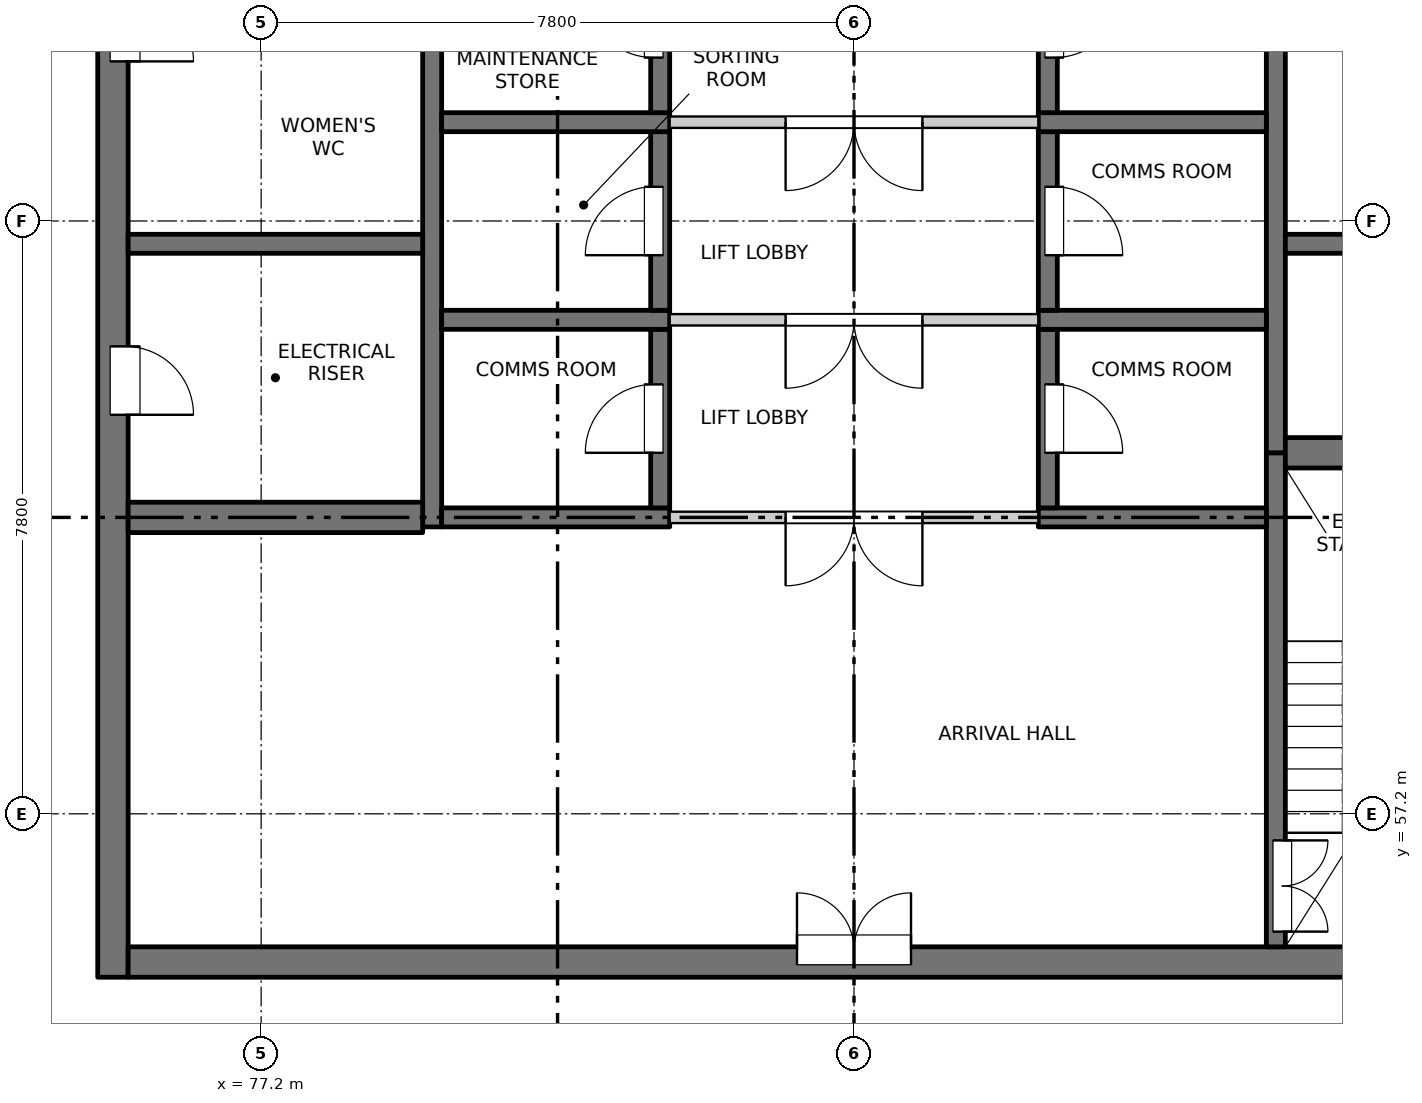
"""IFC4 building model, lengths in metres.
Left out: names, types, materials, properties, quantities, classifications, styles, units other than length and angle.
Written with IfcOpenShell. Run it as: python <this file> out.ifc"""

import sys

from ifc_helpers import new_model, si_unit, direction, frame, frame_2d, origin, place, context, subcontext, project, spatial, rectangle, extrude, element, fill, save


model = new_model("IFC4")
c1 = context("Model", 3, precision=1e-05, world=origin(), true_north=direction((0.0, 1.0)))
c2 = subcontext(c1, "Body", "Model", "MODEL_VIEW")
j1 = project(units=[si_unit("LENGTHUNIT", "METRE"), si_unit("PLANEANGLEUNIT", "RADIAN")], contexts=[c1])
p1 = place(None, origin())
s1 = spatial("IfcSite", under=j1, at=p1, CompositionType="ELEMENT")
p2 = place(p1, origin())
s2 = spatial("IfcBuilding", under=s1, at=p2, CompositionType="ELEMENT")
p3 = place(p2, frame((0.0, 0.0, 263.0)))
s3 = spatial("IfcBuildingStorey", under=s2, at=p3, CompositionType="ELEMENT", Elevation=263.0)
p4 = place(p3, frame((75.25, 55.05, -0.25), z_axis=(0.0, 0.0, 1.0), x_axis=(0.0, 1.0, 0.0)))
e1 = element("IfcWall", 1, at=p4, inside=s3, PredefinedType="SOLIDWALL", context=c2, shape_type="SweptSolid", body=[
    extrude(rectangle(XDim=22.25, YDim=0.4, at=frame_2d((11.125, 0.0))), origin(), (0.0, 0.0, 1.0), 3.35),
])
p5 = place(p4, frame((7.4, 0.0, 0.25)))
e2 = element("IfcOpeningElement", 2, at=p5, cuts=e1, PredefinedType="OPENING", context=c2, shape_type="SweptSolid", body=[
    extrude(rectangle(XDim=0.9, YDim=2.1, at=frame_2d((0.45, 1.05))), frame((0.0, 0.21, 0.0), z_axis=(0.0, -1.0, 0.0), x_axis=(1.0, 0.0, 0.0)), (0.0, 0.0, 1.0), 0.42),
])
p6 = place(p4, frame((12.05, 0.0, 0.25)))
e3 = element("IfcOpeningElement", 3, at=p6, cuts=e1, PredefinedType="OPENING", context=c2, shape_type="SweptSolid", body=[
    extrude(rectangle(XDim=0.9, YDim=2.1, at=frame_2d((0.45, 1.05))), frame((0.0, 0.21, 0.0), z_axis=(0.0, -1.0, 0.0), x_axis=(1.0, 0.0, 0.0)), (0.0, 0.0, 1.0), 0.42),
])
p7 = place(p4, frame((16.55, 0.0, 0.25)))
e4 = element("IfcOpeningElement", 4, at=p7, cuts=e1, PredefinedType="OPENING", context=c2, shape_type="SweptSolid", body=[
    extrude(rectangle(XDim=0.9, YDim=2.1, at=frame_2d((0.45, 1.05))), frame((0.0, 0.21, 0.0), z_axis=(0.0, -1.0, 0.0), x_axis=(1.0, 0.0, 0.0)), (0.0, 0.0, 1.0), 0.42),
])
p8 = place(p4, frame((20.0, 0.0, 0.25)))
e5 = element("IfcOpeningElement", 5, at=p8, cuts=e1, PredefinedType="OPENING", context=c2, shape_type="SweptSolid", body=[
    extrude(rectangle(XDim=0.9, YDim=2.1, at=frame_2d((0.45, 1.05))), frame((0.0, 0.21, 0.0), z_axis=(0.0, -1.0, 0.0), x_axis=(1.0, 0.0, 0.0)), (0.0, 0.0, 1.0), 0.42),
])
p9 = place(p3, frame((75.45, 55.25, -0.25), z_axis=(0.0, 0.0, 1.0), x_axis=(1.0, 0.0, 0.0)))
e6 = element("IfcWall", 6, at=p9, inside=s3, PredefinedType="SOLIDWALL", context=c2, shape_type="SweptSolid", body=[
    extrude(rectangle(XDim=19.1, YDim=0.4, at=frame_2d((9.55, 0.0))), origin(), (0.0, 0.0, 1.0), 3.35),
])
p10 = place(p9, frame((8.8, 0.0, 0.25)))
e7 = element("IfcOpeningElement", 7, at=p10, cuts=e6, PredefinedType="OPENING", context=c2, shape_type="SweptSolid", body=[
    extrude(rectangle(XDim=1.5, YDim=2.1, at=frame_2d((0.75, 1.05))), frame((0.0, 0.21, 0.0), z_axis=(0.0, -1.0, 0.0), x_axis=(1.0, 0.0, 0.0)), (0.0, 0.0, 1.0), 0.42),
])
p11 = place(p3, frame((79.45, 60.975, -0.25), z_axis=(0.0, 0.0, 1.0), x_axis=(0.0, 1.0, 0.0)))
e8 = element("IfcWall", 8, at=p11, inside=s3, PredefinedType="SOLIDWALL", context=c2, shape_type="SweptSolid", body=[
    extrude(rectangle(XDim=16.325, YDim=0.25, at=frame_2d((8.163, 0.0))), origin(), (0.0, 0.0, 1.0), 3.35),
])
p12 = place(p3, frame((90.55, 55.45, -0.25), z_axis=(0.0, 0.0, 1.0), x_axis=(0.0, 1.0, 0.0)))
e9 = element("IfcWall", 9, at=p12, inside=s3, PredefinedType="SOLIDWALL", context=c2, shape_type="SweptSolid", body=[
    extrude(rectangle(XDim=6.5, YDim=0.25, at=frame_2d((3.25, 0.0))), origin(), (0.0, 0.0, 1.0), 3.35),
])
p13 = place(p12, frame((0.2, 0.0, 0.25)))
e10 = element("IfcOpeningElement", 10, at=p13, cuts=e9, PredefinedType="OPENING", context=c2, shape_type="SweptSolid", body=[
    extrude(rectangle(XDim=1.2, YDim=2.1, at=frame_2d((0.6, 1.05))), frame((0.0, 0.135, 0.0), z_axis=(0.0, -1.0, 0.0), x_axis=(1.0, 0.0, 0.0)), (0.0, 0.0, 1.0), 0.27),
])
p14 = place(p3, frame((90.55, 61.95, -0.25), z_axis=(0.0, 0.0, 1.0), x_axis=(0.0, 1.0, 0.0)))
e11 = element("IfcWall", 11, at=p14, inside=s3, PredefinedType="SOLIDWALL", context=c2, shape_type="SweptSolid", body=[
    extrude(rectangle(XDim=15.35, YDim=0.25, at=frame_2d((7.675, 0.0))), origin(), (0.0, 0.0, 1.0), 3.35),
])
p15 = place(p3, frame((79.575, 61.1, -0.25), z_axis=(0.0, 0.0, 1.0), x_axis=(1.0, 0.0, 0.0)))
e12 = element("IfcWall", 12, at=p15, inside=s3, PredefinedType="SOLIDWALL", context=c2, shape_type="SweptSolid", body=[
    extrude(rectangle(XDim=3.0, YDim=0.25, at=frame_2d((1.5, 0.0))), origin(), (0.0, 0.0, 1.0), 3.35),
])
p16 = place(p3, frame((82.45, 61.225, -0.25), z_axis=(0.0, 0.0, 1.0), x_axis=(0.0, 1.0, 0.0)))
e13 = element("IfcWall", 13, at=p16, inside=s3, PredefinedType="SOLIDWALL", context=c2, shape_type="SweptSolid", body=[
    extrude(rectangle(XDim=2.35, YDim=0.25, at=frame_2d((1.175, 0.0))), origin(), (0.0, 0.0, 1.0), 3.35),
])
p17 = place(p16, frame((0.725, 0.0, 0.25)))
e14 = element("IfcOpeningElement", 14, at=p17, cuts=e13, PredefinedType="OPENING", context=c2, shape_type="SweptSolid", body=[
    extrude(rectangle(XDim=0.9, YDim=2.1, at=frame_2d((0.45, 1.05))), frame((0.0, 0.135, 0.0), z_axis=(0.0, -1.0, 0.0), x_axis=(1.0, 0.0, 0.0)), (0.0, 0.0, 1.0), 0.27),
])
p18 = place(p3, frame((79.575, 63.7, -0.25), z_axis=(0.0, 0.0, 1.0), x_axis=(1.0, 0.0, 0.0)))
e15 = element("IfcWall", 15, at=p18, inside=s3, PredefinedType="SOLIDWALL", context=c2, shape_type="SweptSolid", body=[
    extrude(rectangle(XDim=3.0, YDim=0.25, at=frame_2d((1.5, 0.0))), origin(), (0.0, 0.0, 1.0), 3.35),
])
p19 = place(p3, frame((82.45, 63.825, -0.25), z_axis=(0.0, 0.0, 1.0), x_axis=(0.0, 1.0, 0.0)))
e16 = element("IfcWall", 16, at=p19, inside=s3, PredefinedType="SOLIDWALL", context=c2, shape_type="SweptSolid", body=[
    extrude(rectangle(XDim=2.35, YDim=0.25, at=frame_2d((1.175, 0.0))), origin(), (0.0, 0.0, 1.0), 3.35),
])
p20 = place(p19, frame((0.725, 0.0, 0.25)))
e17 = element("IfcOpeningElement", 17, at=p20, cuts=e16, PredefinedType="OPENING", context=c2, shape_type="SweptSolid", body=[
    extrude(rectangle(XDim=0.9, YDim=2.1, at=frame_2d((0.45, 1.05))), frame((0.0, 0.135, 0.0), z_axis=(0.0, -1.0, 0.0), x_axis=(1.0, 0.0, 0.0)), (0.0, 0.0, 1.0), 0.27),
])
p21 = place(p3, frame((79.575, 66.3, -0.25), z_axis=(0.0, 0.0, 1.0), x_axis=(1.0, 0.0, 0.0)))
e18 = element("IfcWall", 18, at=p21, inside=s3, PredefinedType="SOLIDWALL", context=c2, shape_type="SweptSolid", body=[
    extrude(rectangle(XDim=3.0, YDim=0.25, at=frame_2d((1.5, 0.0))), origin(), (0.0, 0.0, 1.0), 3.35),
])
p22 = place(p3, frame((82.45, 66.425, -0.25), z_axis=(0.0, 0.0, 1.0), x_axis=(0.0, 1.0, 0.0)))
e19 = element("IfcWall", 19, at=p22, inside=s3, PredefinedType="SOLIDWALL", context=c2, shape_type="SweptSolid", body=[
    extrude(rectangle(XDim=2.35, YDim=0.25, at=frame_2d((1.175, 0.0))), origin(), (0.0, 0.0, 1.0), 3.35),
])
p23 = place(p22, frame((0.725, 0.0, 0.25)))
e20 = element("IfcOpeningElement", 20, at=p23, cuts=e19, PredefinedType="OPENING", context=c2, shape_type="SweptSolid", body=[
    extrude(rectangle(XDim=0.9, YDim=2.1, at=frame_2d((0.45, 1.05))), frame((0.0, 0.135, 0.0), z_axis=(0.0, -1.0, 0.0), x_axis=(1.0, 0.0, 0.0)), (0.0, 0.0, 1.0), 0.27),
])
p24 = place(p3, frame((87.425, 61.1, -0.25), z_axis=(0.0, 0.0, 1.0), x_axis=(1.0, 0.0, 0.0)))
e21 = element("IfcWall", 21, at=p24, inside=s3, PredefinedType="SOLIDWALL", context=c2, shape_type="SweptSolid", body=[
    extrude(rectangle(XDim=3.0, YDim=0.25, at=frame_2d((1.5, 0.0))), origin(), (0.0, 0.0, 1.0), 3.35),
])
p25 = place(p3, frame((87.55, 61.225, -0.25), z_axis=(0.0, 0.0, 1.0), x_axis=(0.0, 1.0, 0.0)))
e22 = element("IfcWall", 22, at=p25, inside=s3, PredefinedType="SOLIDWALL", context=c2, shape_type="SweptSolid", body=[
    extrude(rectangle(XDim=2.35, YDim=0.25, at=frame_2d((1.175, 0.0))), origin(), (0.0, 0.0, 1.0), 3.35),
])
p26 = place(p25, frame((0.725, 0.0, 0.25)))
e23 = element("IfcOpeningElement", 23, at=p26, cuts=e22, PredefinedType="OPENING", context=c2, shape_type="SweptSolid", body=[
    extrude(rectangle(XDim=0.9, YDim=2.1, at=frame_2d((0.45, 1.05))), frame((0.0, 0.135, 0.0), z_axis=(0.0, -1.0, 0.0), x_axis=(1.0, 0.0, 0.0)), (0.0, 0.0, 1.0), 0.27),
])
p27 = place(p3, frame((87.425, 63.7, -0.25), z_axis=(0.0, 0.0, 1.0), x_axis=(1.0, 0.0, 0.0)))
e24 = element("IfcWall", 24, at=p27, inside=s3, PredefinedType="SOLIDWALL", context=c2, shape_type="SweptSolid", body=[
    extrude(rectangle(XDim=3.0, YDim=0.25, at=frame_2d((1.5, 0.0))), origin(), (0.0, 0.0, 1.0), 3.35),
])
p28 = place(p3, frame((87.55, 63.825, -0.25), z_axis=(0.0, 0.0, 1.0), x_axis=(0.0, 1.0, 0.0)))
e25 = element("IfcWall", 25, at=p28, inside=s3, PredefinedType="SOLIDWALL", context=c2, shape_type="SweptSolid", body=[
    extrude(rectangle(XDim=2.35, YDim=0.25, at=frame_2d((1.175, 0.0))), origin(), (0.0, 0.0, 1.0), 3.35),
])
p29 = place(p28, frame((0.725, 0.0, 0.25)))
e26 = element("IfcOpeningElement", 26, at=p29, cuts=e25, PredefinedType="OPENING", context=c2, shape_type="SweptSolid", body=[
    extrude(rectangle(XDim=0.9, YDim=2.1, at=frame_2d((0.45, 1.05))), frame((0.0, 0.135, 0.0), z_axis=(0.0, -1.0, 0.0), x_axis=(1.0, 0.0, 0.0)), (0.0, 0.0, 1.0), 0.27),
])
p30 = place(p3, frame((87.425, 66.3, -0.25), z_axis=(0.0, 0.0, 1.0), x_axis=(1.0, 0.0, 0.0)))
e27 = element("IfcWall", 27, at=p30, inside=s3, PredefinedType="SOLIDWALL", context=c2, shape_type="SweptSolid", body=[
    extrude(rectangle(XDim=3.0, YDim=0.25, at=frame_2d((1.5, 0.0))), origin(), (0.0, 0.0, 1.0), 3.35),
])
p31 = place(p3, frame((87.55, 66.425, -0.25), z_axis=(0.0, 0.0, 1.0), x_axis=(0.0, 1.0, 0.0)))
e28 = element("IfcWall", 28, at=p31, inside=s3, PredefinedType="SOLIDWALL", context=c2, shape_type="SweptSolid", body=[
    extrude(rectangle(XDim=2.35, YDim=0.25, at=frame_2d((1.175, 0.0))), origin(), (0.0, 0.0, 1.0), 3.35),
])
p32 = place(p31, frame((0.725, 0.0, 0.25)))
e29 = element("IfcOpeningElement", 29, at=p32, cuts=e28, PredefinedType="OPENING", context=c2, shape_type="SweptSolid", body=[
    extrude(rectangle(XDim=0.9, YDim=2.1, at=frame_2d((0.45, 1.05))), frame((0.0, 0.135, 0.0), z_axis=(0.0, -1.0, 0.0), x_axis=(1.0, 0.0, 0.0)), (0.0, 0.0, 1.0), 0.27),
])
p33 = place(p3, frame((75.45, 61.1, -0.25), z_axis=(0.0, 0.0, 1.0), x_axis=(1.0, 0.0, 0.0)))
e30 = element("IfcWall", 30, at=p33, inside=s3, PredefinedType="SOLIDWALL", context=c2, shape_type="SweptSolid", body=[
    extrude(rectangle(XDim=3.875, YDim=0.4, at=frame_2d((1.938, 0.0))), origin(), (0.0, 0.0, 1.0), 3.35),
])
p34 = place(p3, frame((75.45, 64.7, -0.25), z_axis=(0.0, 0.0, 1.0), x_axis=(1.0, 0.0, 0.0)))
e31 = element("IfcWall", 31, at=p34, inside=s3, PredefinedType="SOLIDWALL", context=c2, shape_type="SweptSolid", body=[
    extrude(rectangle(XDim=3.875, YDim=0.25, at=frame_2d((1.938, 0.0))), origin(), (0.0, 0.0, 1.0), 3.35),
])
p35 = place(p3, frame((90.675, 61.95, -0.25), z_axis=(0.0, 0.0, 1.0), x_axis=(1.0, 0.0, 0.0)))
e32 = element("IfcWall", 32, at=p35, inside=s3, PredefinedType="SOLIDWALL", context=c2, shape_type="SweptSolid", body=[
    extrude(rectangle(XDim=3.875, YDim=0.4, at=frame_2d((1.938, 0.0))), origin(), (0.0, 0.0, 1.0), 3.35),
])
p36 = place(p3, frame((90.675, 64.7, -0.25), z_axis=(0.0, 0.0, 1.0), x_axis=(1.0, 0.0, 0.0)))
e33 = element("IfcWall", 33, at=p36, inside=s3, PredefinedType="SOLIDWALL", context=c2, shape_type="SweptSolid", body=[
    extrude(rectangle(XDim=3.875, YDim=0.25, at=frame_2d((1.938, 0.0))), origin(), (0.0, 0.0, 1.0), 3.35),
])
p37 = place(p3, frame((82.575, 61.1, 0.0), z_axis=(0.0, 0.0, 1.0), x_axis=(1.0, 0.0, 0.0)))
e34 = element("IfcWall", 34, at=p37, inside=s3, PredefinedType="PARTITIONING", context=c2, shape_type="SweptSolid", body=[
    extrude(rectangle(XDim=4.85, YDim=0.15, at=frame_2d((2.425, 0.0))), origin(), (0.0, 0.0, 1.0), 3.1),
])
p38 = place(p37, frame((1.525, 0.0, 0.0)))
e35 = element("IfcOpeningElement", 35, at=p38, cuts=e34, PredefinedType="OPENING", context=c2, shape_type="SweptSolid", body=[
    extrude(rectangle(XDim=1.8, YDim=2.1, at=frame_2d((0.9, 1.05))), frame((0.0, 0.085, 0.0), z_axis=(0.0, -1.0, 0.0), x_axis=(1.0, 0.0, 0.0)), (0.0, 0.0, 1.0), 0.17),
])
p39 = place(p3, frame((82.575, 63.7, 0.0), z_axis=(0.0, 0.0, 1.0), x_axis=(1.0, 0.0, 0.0)))
e36 = element("IfcWall", 36, at=p39, inside=s3, PredefinedType="PARTITIONING", context=c2, shape_type="SweptSolid", body=[
    extrude(rectangle(XDim=4.85, YDim=0.15, at=frame_2d((2.425, 0.0))), origin(), (0.0, 0.0, 1.0), 3.1),
])
p40 = place(p39, frame((1.525, 0.0, 0.0)))
e37 = element("IfcOpeningElement", 37, at=p40, cuts=e36, PredefinedType="OPENING", context=c2, shape_type="SweptSolid", body=[
    extrude(rectangle(XDim=1.8, YDim=2.1, at=frame_2d((0.9, 1.05))), frame((0.0, 0.085, 0.0), z_axis=(0.0, -1.0, 0.0), x_axis=(1.0, 0.0, 0.0)), (0.0, 0.0, 1.0), 0.17),
])
p41 = place(p3, frame((82.575, 66.3, 0.0), z_axis=(0.0, 0.0, 1.0), x_axis=(1.0, 0.0, 0.0)))
e38 = element("IfcWall", 38, at=p41, inside=s3, PredefinedType="PARTITIONING", context=c2, shape_type="SweptSolid", body=[
    extrude(rectangle(XDim=4.85, YDim=0.15, at=frame_2d((2.425, 0.0))), origin(), (0.0, 0.0, 1.0), 3.1),
])
p42 = place(p41, frame((1.525, 0.0, 0.0)))
e39 = element("IfcOpeningElement", 39, at=p42, cuts=e38, PredefinedType="OPENING", context=c2, shape_type="SweptSolid", body=[
    extrude(rectangle(XDim=1.8, YDim=2.1, at=frame_2d((0.9, 1.05))), frame((0.0, 0.085, 0.0), z_axis=(0.0, -1.0, 0.0), x_axis=(1.0, 0.0, 0.0)), (0.0, 0.0, 1.0), 0.17),
])
p43 = place(p10, origin())
e40 = element("IfcDoor", 40, at=p43, inside=s3, OperationType="DOUBLE_DOOR_SINGLE_SWING", PredefinedType="DOOR", context=c2, shape_type="SweptSolid", body=[
    extrude(rectangle(XDim=1.5, YDim=2.1, at=frame_2d((0.75, 1.05))), frame((0.0, 0.185, 0.0), z_axis=(0.0, -1.0, 0.0), x_axis=(1.0, 0.0, 0.0)), (0.0, 0.0, 1.0), 0.05),
])
fill(e7, e40)
p44 = place(p13, origin())
e41 = element("IfcDoor", 41, at=p44, inside=s3, OperationType="DOUBLE_DOOR_SINGLE_SWING", PredefinedType="DOOR", context=c2, shape_type="SweptSolid", body=[
    extrude(rectangle(XDim=1.2, YDim=2.1, at=frame_2d((0.6, 1.05))), frame((0.0, -0.06, 0.0), z_axis=(0.0, -1.0, 0.0), x_axis=(1.0, 0.0, 0.0)), (0.0, 0.0, 1.0), 0.05),
])
fill(e10, e41)
p45 = place(p38, origin())
e42 = element("IfcDoor", 42, at=p45, inside=s3, OperationType="DOUBLE_DOOR_SINGLE_SWING", PredefinedType="DOOR", context=c2, shape_type="SweptSolid", body=[
    extrude(rectangle(XDim=1.8, YDim=2.1, at=frame_2d((0.9, 1.05))), frame((0.0, 0.025, 0.0), z_axis=(0.0, -1.0, 0.0), x_axis=(1.0, 0.0, 0.0)), (0.0, 0.0, 1.0), 0.05),
])
fill(e35, e42)
p46 = place(p17, origin())
e43 = element("IfcDoor", 43, at=p46, inside=s3, OperationType="SINGLE_SWING_LEFT", PredefinedType="DOOR", context=c2, shape_type="SweptSolid", body=[
    extrude(rectangle(XDim=0.9, YDim=2.1, at=frame_2d((0.45, 1.05))), frame((0.0, 0.11, 0.0), z_axis=(0.0, -1.0, 0.0), x_axis=(1.0, 0.0, 0.0)), (0.0, 0.0, 1.0), 0.05),
])
fill(e14, e43)
p47 = place(p26, origin())
e44 = element("IfcDoor", 44, at=p47, inside=s3, OperationType="SINGLE_SWING_RIGHT", PredefinedType="DOOR", context=c2, shape_type="SweptSolid", body=[
    extrude(rectangle(XDim=0.9, YDim=2.1, at=frame_2d((0.45, 1.05))), frame((0.0, -0.06, 0.0), z_axis=(0.0, -1.0, 0.0), x_axis=(1.0, 0.0, 0.0)), (0.0, 0.0, 1.0), 0.05),
])
fill(e23, e44)
p48 = place(p5, origin())
e45 = element("IfcDoor", 45, at=p48, inside=s3, OperationType="SINGLE_SWING_RIGHT", PredefinedType="DOOR", context=c2, shape_type="SweptSolid", body=[
    extrude(rectangle(XDim=0.9, YDim=2.1, at=frame_2d((0.45, 1.05))), frame((0.0, -0.135, 0.0), z_axis=(0.0, -1.0, 0.0), x_axis=(1.0, 0.0, 0.0)), (0.0, 0.0, 1.0), 0.05),
])
fill(e2, e45)
p49 = place(p40, origin())
e46 = element("IfcDoor", 46, at=p49, inside=s3, OperationType="DOUBLE_DOOR_SINGLE_SWING", PredefinedType="DOOR", context=c2, shape_type="SweptSolid", body=[
    extrude(rectangle(XDim=1.8, YDim=2.1, at=frame_2d((0.9, 1.05))), frame((0.0, 0.025, 0.0), z_axis=(0.0, -1.0, 0.0), x_axis=(1.0, 0.0, 0.0)), (0.0, 0.0, 1.0), 0.05),
])
fill(e37, e46)
p50 = place(p20, origin())
e47 = element("IfcDoor", 47, at=p50, inside=s3, OperationType="SINGLE_SWING_LEFT", PredefinedType="DOOR", context=c2, shape_type="SweptSolid", body=[
    extrude(rectangle(XDim=0.9, YDim=2.1, at=frame_2d((0.45, 1.05))), frame((0.0, 0.11, 0.0), z_axis=(0.0, -1.0, 0.0), x_axis=(1.0, 0.0, 0.0)), (0.0, 0.0, 1.0), 0.05),
])
fill(e17, e47)
p51 = place(p29, origin())
e48 = element("IfcDoor", 48, at=p51, inside=s3, OperationType="SINGLE_SWING_RIGHT", PredefinedType="DOOR", context=c2, shape_type="SweptSolid", body=[
    extrude(rectangle(XDim=0.9, YDim=2.1, at=frame_2d((0.45, 1.05))), frame((0.0, -0.06, 0.0), z_axis=(0.0, -1.0, 0.0), x_axis=(1.0, 0.0, 0.0)), (0.0, 0.0, 1.0), 0.05),
])
fill(e26, e48)
p52 = place(p42, origin())
e49 = element("IfcDoor", 49, at=p52, inside=s3, OperationType="DOUBLE_DOOR_SINGLE_SWING", PredefinedType="DOOR", context=c2, shape_type="SweptSolid", body=[
    extrude(rectangle(XDim=1.8, YDim=2.1, at=frame_2d((0.9, 1.05))), frame((0.0, 0.025, 0.0), z_axis=(0.0, -1.0, 0.0), x_axis=(1.0, 0.0, 0.0)), (0.0, 0.0, 1.0), 0.05),
])
fill(e39, e49)
p53 = place(p6, origin())
e50 = element("IfcDoor", 50, at=p53, inside=s3, OperationType="SINGLE_SWING_RIGHT", PredefinedType="DOOR", context=c2, shape_type="SweptSolid", body=[
    extrude(rectangle(XDim=0.9, YDim=2.1, at=frame_2d((0.45, 1.05))), frame((0.0, -0.135, 0.0), z_axis=(0.0, -1.0, 0.0), x_axis=(1.0, 0.0, 0.0)), (0.0, 0.0, 1.0), 0.05),
])
fill(e3, e50)
p54 = place(p23, origin())
e51 = element("IfcDoor", 51, at=p54, inside=s3, OperationType="SINGLE_SWING_RIGHT", PredefinedType="DOOR", context=c2, shape_type="SweptSolid", body=[
    extrude(rectangle(XDim=0.9, YDim=2.1, at=frame_2d((0.45, 1.05))), frame((0.0, 0.11, 0.0), z_axis=(0.0, -1.0, 0.0), x_axis=(1.0, 0.0, 0.0)), (0.0, 0.0, 1.0), 0.05),
])
fill(e20, e51)
p55 = place(p32, origin())
e52 = element("IfcDoor", 52, at=p55, inside=s3, OperationType="SINGLE_SWING_LEFT", PredefinedType="DOOR", context=c2, shape_type="SweptSolid", body=[
    extrude(rectangle(XDim=0.9, YDim=2.1, at=frame_2d((0.45, 1.05))), frame((0.0, -0.06, 0.0), z_axis=(0.0, -1.0, 0.0), x_axis=(1.0, 0.0, 0.0)), (0.0, 0.0, 1.0), 0.05),
])
fill(e29, e52)
save(model, sys.argv[1])
